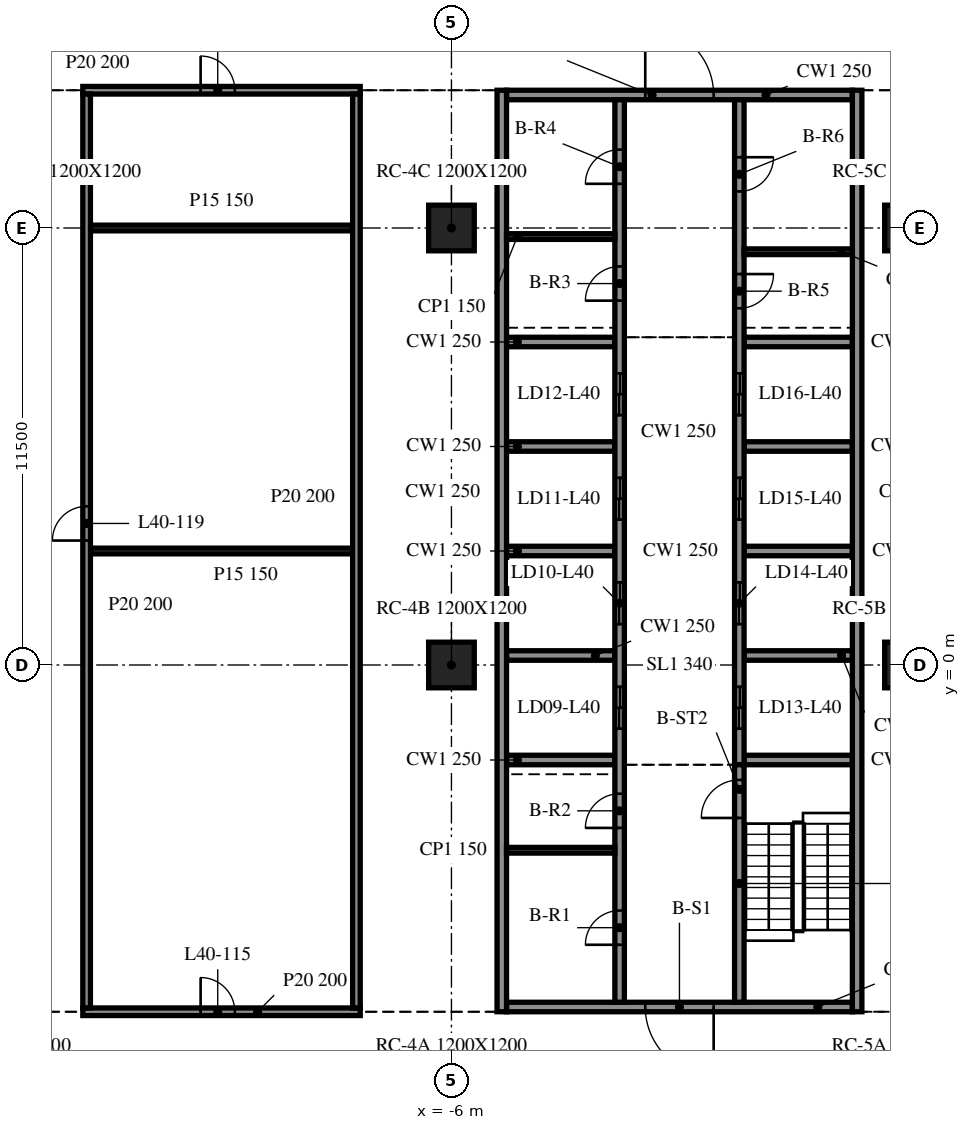
"""IFC4 building model, lengths in metres.
Left out: names, types, materials, properties, quantities, classifications, styles, units other than length and angle.
Written with IfcOpenShell. Run it as: python <this file> out.ifc"""

import sys

from ifc_helpers import new_model, si_unit, direction, frame, frame_2d, origin, origin_2d, place, context, subcontext, project, spatial, rectangle, extrude, element, fill, save


model = new_model("IFC4")
c1 = context("Model", 3, precision=1e-05, world=origin(), true_north=direction((0.0, 1.0)))
c2 = subcontext(c1, "Body", "Model", "MODEL_VIEW")
j1 = project(units=[si_unit("LENGTHUNIT", "METRE"), si_unit("PLANEANGLEUNIT", "RADIAN")], contexts=[c1])
p1 = place(None, origin())
s1 = spatial("IfcSite", under=j1, at=p1, CompositionType="ELEMENT")
p2 = place(p1, origin())
s2 = spatial("IfcBuilding", under=s1, at=p2, CompositionType="ELEMENT")
p3 = place(p2, frame((0.0, 0.0, 170.6)))
s3 = spatial("IfcBuildingStorey", under=s2, at=p3, CompositionType="ELEMENT", Elevation=170.6)
for number, where, z_axis, x_axis in (
    (1, (-6.0, 0.0, -0.34), (0.0, 0.0, 1.0), (1.0, 0.0, 0.0)),
    (2, (-6.0, 11.5, -0.34), (0.0, 0.0, 1.0), (1.0, 0.0, 0.0)),
    (3, (6.0, 0.0, -0.34), (0.0, 0.0, 1.0), (1.0, 0.0, 0.0)),
    (4, (6.0, 11.5, -0.34), (0.0, 0.0, 1.0), (1.0, 0.0, 0.0)),
):
    element("IfcColumn", number, at=place(p3, frame(where, z_axis=z_axis, x_axis=x_axis)), inside=s3, PredefinedType="COLUMN", context=c2, shape_type="SweptSolid", body=[
        extrude(rectangle(XDim=1.2, YDim=1.2, at=origin_2d()), origin(), (0.0, 0.0, 1.0), 3.8),
    ])
for number, where, z_axis, x_axis in (
    (5, (-4.675, 15.125, 0.0), (0.0, 0.0, 1.0), (0.0, -1.0, 0.0)),
    (6, (4.675, -9.125, 0.0), (0.0, 0.0, 1.0), (0.0, 1.0, 0.0)),
):
    element("IfcWall", number, at=place(p3, frame(where, z_axis=z_axis, x_axis=x_axis)), inside=s3, PredefinedType="SOLIDWALL", context=c2, shape_type="SweptSolid", body=[
        extrude(rectangle(XDim=24.25, YDim=0.25, at=frame_2d((12.125, 0.0))), origin(), (0.0, 0.0, 1.0), 3.46),
    ])
p4 = place(p3, frame((4.55, -9.0, 0.0), z_axis=(0.0, 0.0, 1.0), x_axis=(-1.0, 0.0, 0.0)))
e7 = element("IfcWall", 7, at=p4, inside=s3, PredefinedType="SOLIDWALL", context=c2, shape_type="SweptSolid", body=[
    extrude(rectangle(XDim=9.1, YDim=0.25, at=frame_2d((4.55, 0.0))), origin(), (0.0, 0.0, 1.0), 3.46),
])
p5 = place(p4, frame((3.65, 0.0, 0.0)))
e8 = element("IfcOpeningElement", 8, at=p5, cuts=e7, PredefinedType="OPENING", context=c2, shape_type="SweptSolid", body=[
    extrude(rectangle(XDim=1.8, YDim=2.1, at=frame_2d((0.9, 1.05))), frame((0.0, 0.135, 0.0), z_axis=(0.0, -1.0, 0.0), x_axis=(1.0, 0.0, 0.0)), (0.0, 0.0, 1.0), 0.27),
])
p6 = place(p3, frame((-4.55, 15.0, 0.0), z_axis=(0.0, 0.0, 1.0), x_axis=(1.0, 0.0, 0.0)))
e9 = element("IfcWall", 9, at=p6, inside=s3, PredefinedType="SOLIDWALL", context=c2, shape_type="SweptSolid", body=[
    extrude(rectangle(XDim=9.1, YDim=0.25, at=frame_2d((4.55, 0.0))), origin(), (0.0, 0.0, 1.0), 3.46),
])
p7 = place(p6, frame((3.65, 0.0, 0.0)))
e10 = element("IfcOpeningElement", 10, at=p7, cuts=e9, PredefinedType="OPENING", context=c2, shape_type="SweptSolid", body=[
    extrude(rectangle(XDim=1.8, YDim=2.1, at=frame_2d((0.9, 1.05))), frame((0.0, 0.135, 0.0), z_axis=(0.0, -1.0, 0.0), x_axis=(1.0, 0.0, 0.0)), (0.0, 0.0, 1.0), 0.27),
])
p8 = place(p3, frame((-1.575, -8.875, 0.0), z_axis=(0.0, 0.0, 1.0), x_axis=(0.0, 1.0, 0.0)))
e11 = element("IfcWall", 11, at=p8, inside=s3, PredefinedType="SOLIDWALL", context=c2, shape_type="SweptSolid", body=[
    extrude(rectangle(XDim=23.75, YDim=0.25, at=frame_2d((11.875, 0.0))), origin(), (0.0, 0.0, 1.0), 3.46),
])
p9 = place(p8, frame((7.2, 0.0, 0.0)))
e12 = element("IfcOpeningElement", 12, at=p9, cuts=e11, PredefinedType="OPENING", context=c2, shape_type="SweptSolid", body=[
    extrude(rectangle(XDim=1.1, YDim=2.1, at=frame_2d((0.55, 1.05))), frame((0.0, 0.135, 0.0), z_axis=(0.0, -1.0, 0.0), x_axis=(1.0, 0.0, 0.0)), (0.0, 0.0, 1.0), 0.27),
])
p10 = place(p8, frame((9.95, 0.0, 0.0)))
e13 = element("IfcOpeningElement", 13, at=p10, cuts=e11, PredefinedType="OPENING", context=c2, shape_type="SweptSolid", body=[
    extrude(rectangle(XDim=1.1, YDim=2.1, at=frame_2d((0.55, 1.05))), frame((0.0, 0.135, 0.0), z_axis=(0.0, -1.0, 0.0), x_axis=(1.0, 0.0, 0.0)), (0.0, 0.0, 1.0), 0.27),
])
p11 = place(p8, frame((12.7, 0.0, 0.0)))
e14 = element("IfcOpeningElement", 14, at=p11, cuts=e11, PredefinedType="OPENING", context=c2, shape_type="SweptSolid", body=[
    extrude(rectangle(XDim=1.1, YDim=2.1, at=frame_2d((0.55, 1.05))), frame((0.0, 0.135, 0.0), z_axis=(0.0, -1.0, 0.0), x_axis=(1.0, 0.0, 0.0)), (0.0, 0.0, 1.0), 0.27),
])
p12 = place(p8, frame((15.45, 0.0, 0.0)))
e15 = element("IfcOpeningElement", 15, at=p12, cuts=e11, PredefinedType="OPENING", context=c2, shape_type="SweptSolid", body=[
    extrude(rectangle(XDim=1.1, YDim=2.1, at=frame_2d((0.55, 1.05))), frame((0.0, 0.135, 0.0), z_axis=(0.0, -1.0, 0.0), x_axis=(1.0, 0.0, 0.0)), (0.0, 0.0, 1.0), 0.27),
])
p13 = place(p8, frame((1.512, 0.0, 0.0)))
e16 = element("IfcOpeningElement", 16, at=p13, cuts=e11, PredefinedType="OPENING", context=c2, shape_type="SweptSolid", body=[
    extrude(rectangle(XDim=0.9, YDim=2.1, at=frame_2d((0.45, 1.05))), frame((0.0, 0.135, 0.0), z_axis=(0.0, -1.0, 0.0), x_axis=(1.0, 0.0, 0.0)), (0.0, 0.0, 1.0), 0.27),
])
p14 = place(p8, frame((4.587, 0.0, 0.0)))
e17 = element("IfcOpeningElement", 17, at=p14, cuts=e11, PredefinedType="OPENING", context=c2, shape_type="SweptSolid", body=[
    extrude(rectangle(XDim=0.9, YDim=2.1, at=frame_2d((0.45, 1.05))), frame((0.0, 0.135, 0.0), z_axis=(0.0, -1.0, 0.0), x_axis=(1.0, 0.0, 0.0)), (0.0, 0.0, 1.0), 0.27),
])
p15 = place(p8, frame((18.462, 0.0, 0.0)))
e18 = element("IfcOpeningElement", 18, at=p15, cuts=e11, PredefinedType="OPENING", context=c2, shape_type="SweptSolid", body=[
    extrude(rectangle(XDim=0.9, YDim=2.1, at=frame_2d((0.45, 1.05))), frame((0.0, 0.135, 0.0), z_axis=(0.0, -1.0, 0.0), x_axis=(1.0, 0.0, 0.0)), (0.0, 0.0, 1.0), 0.27),
])
p16 = place(p8, frame((21.538, 0.0, 0.0)))
e19 = element("IfcOpeningElement", 19, at=p16, cuts=e11, PredefinedType="OPENING", context=c2, shape_type="SweptSolid", body=[
    extrude(rectangle(XDim=0.9, YDim=2.1, at=frame_2d((0.45, 1.05))), frame((0.0, 0.135, 0.0), z_axis=(0.0, -1.0, 0.0), x_axis=(1.0, 0.0, 0.0)), (0.0, 0.0, 1.0), 0.27),
])
p17 = place(p3, frame((1.575, -8.875, 0.0), z_axis=(0.0, 0.0, 1.0), x_axis=(0.0, 1.0, 0.0)))
e20 = element("IfcWall", 20, at=p17, inside=s3, PredefinedType="SOLIDWALL", context=c2, shape_type="SweptSolid", body=[
    extrude(rectangle(XDim=6.25, YDim=0.25, at=frame_2d((3.125, 0.0))), origin(), (0.0, 0.0, 1.0), 3.46),
])
p18 = place(p17, frame((4.85, 0.0, 0.0)))
e21 = element("IfcOpeningElement", 21, at=p18, cuts=e20, PredefinedType="OPENING", context=c2, shape_type="SweptSolid", body=[
    extrude(rectangle(XDim=1.0, YDim=2.1, at=frame_2d((0.5, 1.05))), frame((0.0, 0.135, 0.0), z_axis=(0.0, -1.0, 0.0), x_axis=(1.0, 0.0, 0.0)), (0.0, 0.0, 1.0), 0.27),
])
p19 = place(p3, frame((1.575, 14.875, 0.0), z_axis=(0.0, 0.0, 1.0), x_axis=(0.0, -1.0, 0.0)))
e22 = element("IfcWall", 22, at=p19, inside=s3, PredefinedType="SOLIDWALL", context=c2, shape_type="SweptSolid", body=[
    extrude(rectangle(XDim=17.5, YDim=0.25, at=frame_2d((8.75, 0.0))), origin(), (0.0, 0.0, 1.0), 3.46),
])
p20 = place(p19, frame((15.45, 0.0, 0.0)))
e23 = element("IfcOpeningElement", 23, at=p20, cuts=e22, PredefinedType="OPENING", context=c2, shape_type="SweptSolid", body=[
    extrude(rectangle(XDim=1.1, YDim=2.1, at=frame_2d((0.55, 1.05))), frame((0.0, 0.135, 0.0), z_axis=(0.0, -1.0, 0.0), x_axis=(1.0, 0.0, 0.0)), (0.0, 0.0, 1.0), 0.27),
])
p21 = place(p19, frame((12.7, 0.0, 0.0)))
e24 = element("IfcOpeningElement", 24, at=p21, cuts=e22, PredefinedType="OPENING", context=c2, shape_type="SweptSolid", body=[
    extrude(rectangle(XDim=1.1, YDim=2.1, at=frame_2d((0.55, 1.05))), frame((0.0, 0.135, 0.0), z_axis=(0.0, -1.0, 0.0), x_axis=(1.0, 0.0, 0.0)), (0.0, 0.0, 1.0), 0.27),
])
p22 = place(p19, frame((9.95, 0.0, 0.0)))
e25 = element("IfcOpeningElement", 25, at=p22, cuts=e22, PredefinedType="OPENING", context=c2, shape_type="SweptSolid", body=[
    extrude(rectangle(XDim=1.1, YDim=2.1, at=frame_2d((0.55, 1.05))), frame((0.0, 0.135, 0.0), z_axis=(0.0, -1.0, 0.0), x_axis=(1.0, 0.0, 0.0)), (0.0, 0.0, 1.0), 0.27),
])
p23 = place(p19, frame((7.2, 0.0, 0.0)))
e26 = element("IfcOpeningElement", 26, at=p23, cuts=e22, PredefinedType="OPENING", context=c2, shape_type="SweptSolid", body=[
    extrude(rectangle(XDim=1.1, YDim=2.1, at=frame_2d((0.55, 1.05))), frame((0.0, 0.135, 0.0), z_axis=(0.0, -1.0, 0.0), x_axis=(1.0, 0.0, 0.0)), (0.0, 0.0, 1.0), 0.27),
])
p24 = place(p19, frame((4.587, 0.0, 0.0)))
e27 = element("IfcOpeningElement", 27, at=p24, cuts=e22, PredefinedType="OPENING", context=c2, shape_type="SweptSolid", body=[
    extrude(rectangle(XDim=0.9, YDim=2.1, at=frame_2d((0.45, 1.05))), frame((0.0, 0.135, 0.0), z_axis=(0.0, -1.0, 0.0), x_axis=(1.0, 0.0, 0.0)), (0.0, 0.0, 1.0), 0.27),
])
p25 = place(p19, frame((1.512, 0.0, 0.0)))
e28 = element("IfcOpeningElement", 28, at=p25, cuts=e22, PredefinedType="OPENING", context=c2, shape_type="SweptSolid", body=[
    extrude(rectangle(XDim=0.9, YDim=2.1, at=frame_2d((0.45, 1.05))), frame((0.0, 0.135, 0.0), z_axis=(0.0, -1.0, 0.0), x_axis=(1.0, 0.0, 0.0)), (0.0, 0.0, 1.0), 0.27),
])
for number, where, z_axis, x_axis in (
    (29, (-4.55, -2.5, 0.0), (0.0, 0.0, 1.0), (1.0, 0.0, 0.0)),
    (30, (-4.55, 0.25, 0.0), (0.0, 0.0, 1.0), (1.0, 0.0, 0.0)),
    (31, (-4.55, 3.0, 0.0), (0.0, 0.0, 1.0), (1.0, 0.0, 0.0)),
    (32, (-4.55, 5.75, 0.0), (0.0, 0.0, 1.0), (1.0, 0.0, 0.0)),
    (33, (-4.55, 8.5, 0.0), (0.0, 0.0, 1.0), (1.0, 0.0, 0.0)),
    (34, (1.7, -2.5, 0.0), (0.0, 0.0, 1.0), (1.0, 0.0, 0.0)),
    (35, (1.7, 0.25, 0.0), (0.0, 0.0, 1.0), (1.0, 0.0, 0.0)),
    (36, (1.7, 3.0, 0.0), (0.0, 0.0, 1.0), (1.0, 0.0, 0.0)),
    (37, (1.7, 5.75, 0.0), (0.0, 0.0, 1.0), (1.0, 0.0, 0.0)),
    (38, (1.7, 8.5, 0.0), (0.0, 0.0, 1.0), (1.0, 0.0, 0.0)),
):
    element("IfcWall", number, at=place(p3, frame(where, z_axis=z_axis, x_axis=x_axis)), inside=s3, PredefinedType="SOLIDWALL", context=c2, shape_type="SweptSolid", body=[
        extrude(rectangle(XDim=2.85, YDim=0.25, at=frame_2d((1.425, 0.0))), origin(), (0.0, 0.0, 1.0), 3.46),
    ])
for number, where, z_axis, x_axis in (
    (39, (-4.55, -4.875, 0.0), (0.0, 0.0, 1.0), (1.0, 0.0, 0.0)),
    (40, (-4.55, 11.275, 0.0), (0.0, 0.0, 1.0), (1.0, 0.0, 0.0)),
    (41, (1.7, 10.875, 0.0), (0.0, 0.0, 1.0), (1.0, 0.0, 0.0)),
):
    element("IfcWall", number, at=place(p3, frame(where, z_axis=z_axis, x_axis=x_axis)), inside=s3, PredefinedType="PARTITIONING", context=c2, shape_type="SweptSolid", body=[
        extrude(rectangle(XDim=2.85, YDim=0.15, at=frame_2d((1.425, 0.0))), origin(), (0.0, 0.0, 1.0), 3.46),
    ])
p26 = place(p3, frame((-15.7, -9.125, 0.0), z_axis=(0.0, 0.0, 1.0), x_axis=(1.0, 0.0, 0.0)))
e42 = element("IfcWall", 42, at=p26, inside=s3, PredefinedType="PARTITIONING", context=c2, shape_type="SweptSolid", body=[
    extrude(rectangle(XDim=7.3, YDim=0.2, at=frame_2d((3.65, 0.0))), origin(), (0.0, 0.0, 1.0), 3.46),
])
p27 = place(p26, frame((3.1, 0.0, 0.0)))
e43 = element("IfcOpeningElement", 43, at=p27, cuts=e42, PredefinedType="OPENING", context=c2, shape_type="SweptSolid", body=[
    extrude(rectangle(XDim=0.9, YDim=2.1, at=frame_2d((0.45, 1.05))), frame((0.0, 0.11, 0.0), z_axis=(0.0, -1.0, 0.0), x_axis=(1.0, 0.0, 0.0)), (0.0, 0.0, 1.0), 0.22),
])
for number, where, z_axis, x_axis in (
    (44, (-15.5, 3.0, 0.0), (0.0, 0.0, 1.0), (1.0, 0.0, 0.0)),
    (45, (-15.5, 11.5, 0.0), (0.0, 0.0, 1.0), (1.0, 0.0, 0.0)),
):
    element("IfcWall", number, at=place(p3, frame(where, z_axis=z_axis, x_axis=x_axis)), inside=s3, PredefinedType="PARTITIONING", context=c2, shape_type="SweptSolid", body=[
        extrude(rectangle(XDim=6.9, YDim=0.15, at=frame_2d((3.45, 0.0))), origin(), (0.0, 0.0, 1.0), 3.46),
    ])
p28 = place(p3, frame((-15.7, 15.125, 0.0), z_axis=(0.0, 0.0, 1.0), x_axis=(1.0, 0.0, 0.0)))
e46 = element("IfcWall", 46, at=p28, inside=s3, PredefinedType="PARTITIONING", context=c2, shape_type="SweptSolid", body=[
    extrude(rectangle(XDim=7.3, YDim=0.2, at=frame_2d((3.65, 0.0))), origin(), (0.0, 0.0, 1.0), 3.46),
])
p29 = place(p28, frame((3.1, 0.0, 0.0)))
e47 = element("IfcOpeningElement", 47, at=p29, cuts=e46, PredefinedType="OPENING", context=c2, shape_type="SweptSolid", body=[
    extrude(rectangle(XDim=0.9, YDim=2.1, at=frame_2d((0.45, 1.05))), frame((0.0, 0.11, 0.0), z_axis=(0.0, -1.0, 0.0), x_axis=(1.0, 0.0, 0.0)), (0.0, 0.0, 1.0), 0.22),
])
p30 = place(p3, frame((-15.6, -9.025, 0.0), z_axis=(0.0, 0.0, 1.0), x_axis=(0.0, 1.0, 0.0)))
e48 = element("IfcWall", 48, at=p30, inside=s3, PredefinedType="PARTITIONING", context=c2, shape_type="SweptSolid", body=[
    extrude(rectangle(XDim=24.05, YDim=0.2, at=frame_2d((12.025, 0.0))), origin(), (0.0, 0.0, 1.0), 3.46),
])
p31 = place(p30, frame((12.3, 0.0, 0.0)))
e49 = element("IfcOpeningElement", 49, at=p31, cuts=e48, PredefinedType="OPENING", context=c2, shape_type="SweptSolid", body=[
    extrude(rectangle(XDim=0.9, YDim=2.1, at=frame_2d((0.45, 1.05))), frame((0.0, 0.11, 0.0), z_axis=(0.0, -1.0, 0.0), x_axis=(1.0, 0.0, 0.0)), (0.0, 0.0, 1.0), 0.22),
])
p32 = place(p3, frame((-8.5, -9.025, 0.0), z_axis=(0.0, 0.0, 1.0), x_axis=(0.0, 1.0, 0.0)))
e50 = element("IfcWall", 50, at=p32, inside=s3, PredefinedType="PARTITIONING", context=c2, shape_type="SweptSolid", body=[
    extrude(rectangle(XDim=24.05, YDim=0.2, at=frame_2d((12.025, 0.0))), origin(), (0.0, 0.0, 1.0), 3.46),
])
p33 = place(p5, origin())
e51 = element("IfcDoor", 51, at=p33, inside=s3, OperationType="DOUBLE_DOOR_SINGLE_SWING", PredefinedType="DOOR", context=c2, shape_type="SweptSolid", body=[
    extrude(rectangle(XDim=1.8, YDim=2.1, at=frame_2d((0.9, 1.05))), frame((0.0, 0.025, 0.0), z_axis=(0.0, -1.0, 0.0), x_axis=(1.0, 0.0, 0.0)), (0.0, 0.0, 1.0), 0.05),
])
fill(e8, e51)
p34 = place(p7, origin())
e52 = element("IfcDoor", 52, at=p34, inside=s3, OperationType="DOUBLE_DOOR_SINGLE_SWING", PredefinedType="DOOR", context=c2, shape_type="SweptSolid", body=[
    extrude(rectangle(XDim=1.8, YDim=2.1, at=frame_2d((0.9, 1.05))), frame((0.0, 0.025, 0.0), z_axis=(0.0, -1.0, 0.0), x_axis=(1.0, 0.0, 0.0)), (0.0, 0.0, 1.0), 0.05),
])
fill(e10, e52)
p35 = place(p20, origin())
e53 = element("IfcDoor", 53, at=p35, inside=s3, OperationType="DOUBLE_DOOR_SLIDING", PredefinedType="DOOR", context=c2, shape_type="SweptSolid", body=[
    extrude(rectangle(XDim=1.1, YDim=2.1, at=frame_2d((0.55, 1.05))), frame((0.0, 0.025, 0.0), z_axis=(0.0, -1.0, 0.0), x_axis=(1.0, 0.0, 0.0)), (0.0, 0.0, 1.0), 0.05),
])
fill(e23, e53)
p36 = place(p21, origin())
e54 = element("IfcDoor", 54, at=p36, inside=s3, OperationType="DOUBLE_DOOR_SLIDING", PredefinedType="DOOR", context=c2, shape_type="SweptSolid", body=[
    extrude(rectangle(XDim=1.1, YDim=2.1, at=frame_2d((0.55, 1.05))), frame((0.0, 0.025, 0.0), z_axis=(0.0, -1.0, 0.0), x_axis=(1.0, 0.0, 0.0)), (0.0, 0.0, 1.0), 0.05),
])
fill(e24, e54)
p37 = place(p22, origin())
e55 = element("IfcDoor", 55, at=p37, inside=s3, OperationType="DOUBLE_DOOR_SLIDING", PredefinedType="DOOR", context=c2, shape_type="SweptSolid", body=[
    extrude(rectangle(XDim=1.1, YDim=2.1, at=frame_2d((0.55, 1.05))), frame((0.0, 0.025, 0.0), z_axis=(0.0, -1.0, 0.0), x_axis=(1.0, 0.0, 0.0)), (0.0, 0.0, 1.0), 0.05),
])
fill(e25, e55)
p38 = place(p23, origin())
e56 = element("IfcDoor", 56, at=p38, inside=s3, OperationType="DOUBLE_DOOR_SLIDING", PredefinedType="DOOR", context=c2, shape_type="SweptSolid", body=[
    extrude(rectangle(XDim=1.1, YDim=2.1, at=frame_2d((0.55, 1.05))), frame((0.0, 0.025, 0.0), z_axis=(0.0, -1.0, 0.0), x_axis=(1.0, 0.0, 0.0)), (0.0, 0.0, 1.0), 0.05),
])
fill(e26, e56)
p39 = place(p9, origin())
e57 = element("IfcDoor", 57, at=p39, inside=s3, OperationType="DOUBLE_DOOR_SLIDING", PredefinedType="DOOR", context=c2, shape_type="SweptSolid", body=[
    extrude(rectangle(XDim=1.1, YDim=2.1, at=frame_2d((0.55, 1.05))), frame((0.0, 0.025, 0.0), z_axis=(0.0, -1.0, 0.0), x_axis=(1.0, 0.0, 0.0)), (0.0, 0.0, 1.0), 0.05),
])
fill(e12, e57)
p40 = place(p10, origin())
e58 = element("IfcDoor", 58, at=p40, inside=s3, OperationType="DOUBLE_DOOR_SLIDING", PredefinedType="DOOR", context=c2, shape_type="SweptSolid", body=[
    extrude(rectangle(XDim=1.1, YDim=2.1, at=frame_2d((0.55, 1.05))), frame((0.0, 0.025, 0.0), z_axis=(0.0, -1.0, 0.0), x_axis=(1.0, 0.0, 0.0)), (0.0, 0.0, 1.0), 0.05),
])
fill(e13, e58)
p41 = place(p11, origin())
e59 = element("IfcDoor", 59, at=p41, inside=s3, OperationType="DOUBLE_DOOR_SLIDING", PredefinedType="DOOR", context=c2, shape_type="SweptSolid", body=[
    extrude(rectangle(XDim=1.1, YDim=2.1, at=frame_2d((0.55, 1.05))), frame((0.0, 0.025, 0.0), z_axis=(0.0, -1.0, 0.0), x_axis=(1.0, 0.0, 0.0)), (0.0, 0.0, 1.0), 0.05),
])
fill(e14, e59)
p42 = place(p12, origin())
e60 = element("IfcDoor", 60, at=p42, inside=s3, OperationType="DOUBLE_DOOR_SLIDING", PredefinedType="DOOR", context=c2, shape_type="SweptSolid", body=[
    extrude(rectangle(XDim=1.1, YDim=2.1, at=frame_2d((0.55, 1.05))), frame((0.0, 0.025, 0.0), z_axis=(0.0, -1.0, 0.0), x_axis=(1.0, 0.0, 0.0)), (0.0, 0.0, 1.0), 0.05),
])
fill(e15, e60)
p43 = place(p13, origin())
e61 = element("IfcDoor", 61, at=p43, inside=s3, OperationType="SINGLE_SWING_LEFT", PredefinedType="DOOR", context=c2, shape_type="SweptSolid", body=[
    extrude(rectangle(XDim=0.9, YDim=2.1, at=frame_2d((0.45, 1.05))), frame((0.0, 0.025, 0.0), z_axis=(0.0, -1.0, 0.0), x_axis=(1.0, 0.0, 0.0)), (0.0, 0.0, 1.0), 0.05),
])
fill(e16, e61)
p44 = place(p14, origin())
e62 = element("IfcDoor", 62, at=p44, inside=s3, OperationType="SINGLE_SWING_RIGHT", PredefinedType="DOOR", context=c2, shape_type="SweptSolid", body=[
    extrude(rectangle(XDim=0.9, YDim=2.1, at=frame_2d((0.45, 1.05))), frame((0.0, 0.025, 0.0), z_axis=(0.0, -1.0, 0.0), x_axis=(1.0, 0.0, 0.0)), (0.0, 0.0, 1.0), 0.05),
])
fill(e17, e62)
p45 = place(p15, origin())
e63 = element("IfcDoor", 63, at=p45, inside=s3, OperationType="SINGLE_SWING_LEFT", PredefinedType="DOOR", context=c2, shape_type="SweptSolid", body=[
    extrude(rectangle(XDim=0.9, YDim=2.1, at=frame_2d((0.45, 1.05))), frame((0.0, 0.025, 0.0), z_axis=(0.0, -1.0, 0.0), x_axis=(1.0, 0.0, 0.0)), (0.0, 0.0, 1.0), 0.05),
])
fill(e18, e63)
p46 = place(p16, origin())
e64 = element("IfcDoor", 64, at=p46, inside=s3, OperationType="SINGLE_SWING_RIGHT", PredefinedType="DOOR", context=c2, shape_type="SweptSolid", body=[
    extrude(rectangle(XDim=0.9, YDim=2.1, at=frame_2d((0.45, 1.05))), frame((0.0, 0.025, 0.0), z_axis=(0.0, -1.0, 0.0), x_axis=(1.0, 0.0, 0.0)), (0.0, 0.0, 1.0), 0.05),
])
fill(e19, e64)
p47 = place(p24, origin())
e65 = element("IfcDoor", 65, at=p47, inside=s3, OperationType="SINGLE_SWING_LEFT", PredefinedType="DOOR", context=c2, shape_type="SweptSolid", body=[
    extrude(rectangle(XDim=0.9, YDim=2.1, at=frame_2d((0.45, 1.05))), frame((0.0, 0.025, 0.0), z_axis=(0.0, -1.0, 0.0), x_axis=(1.0, 0.0, 0.0)), (0.0, 0.0, 1.0), 0.05),
])
fill(e27, e65)
p48 = place(p25, origin())
e66 = element("IfcDoor", 66, at=p48, inside=s3, OperationType="SINGLE_SWING_RIGHT", PredefinedType="DOOR", context=c2, shape_type="SweptSolid", body=[
    extrude(rectangle(XDim=0.9, YDim=2.1, at=frame_2d((0.45, 1.05))), frame((0.0, 0.025, 0.0), z_axis=(0.0, -1.0, 0.0), x_axis=(1.0, 0.0, 0.0)), (0.0, 0.0, 1.0), 0.05),
])
fill(e28, e66)
p49 = place(p18, origin())
e67 = element("IfcDoor", 67, at=p49, inside=s3, OperationType="SINGLE_SWING_LEFT", PredefinedType="DOOR", context=c2, shape_type="SweptSolid", body=[
    extrude(rectangle(XDim=1.0, YDim=2.1, at=frame_2d((0.5, 1.05))), frame((0.0, 0.025, 0.0), z_axis=(0.0, -1.0, 0.0), x_axis=(1.0, 0.0, 0.0)), (0.0, 0.0, 1.0), 0.05),
])
fill(e21, e67)
p50 = place(p27, origin())
e68 = element("IfcDoor", 68, at=p50, inside=s3, OperationType="SINGLE_SWING_LEFT", PredefinedType="DOOR", context=c2, shape_type="SweptSolid", body=[
    extrude(rectangle(XDim=0.9, YDim=2.1, at=frame_2d((0.45, 1.05))), frame((0.0, 0.025, 0.0), z_axis=(0.0, -1.0, 0.0), x_axis=(1.0, 0.0, 0.0)), (0.0, 0.0, 1.0), 0.05),
])
fill(e43, e68)
p51 = place(p31, origin())
e69 = element("IfcDoor", 69, at=p51, inside=s3, OperationType="SINGLE_SWING_LEFT", PredefinedType="DOOR", context=c2, shape_type="SweptSolid", body=[
    extrude(rectangle(XDim=0.9, YDim=2.1, at=frame_2d((0.45, 1.05))), frame((0.0, 0.025, 0.0), z_axis=(0.0, -1.0, 0.0), x_axis=(1.0, 0.0, 0.0)), (0.0, 0.0, 1.0), 0.05),
])
fill(e49, e69)
p52 = place(p29, origin())
e70 = element("IfcDoor", 70, at=p52, inside=s3, OperationType="SINGLE_SWING_RIGHT", PredefinedType="DOOR", context=c2, shape_type="SweptSolid", body=[
    extrude(rectangle(XDim=0.9, YDim=2.1, at=frame_2d((0.45, 1.05))), frame((0.0, 0.025, 0.0), z_axis=(0.0, -1.0, 0.0), x_axis=(1.0, 0.0, 0.0)), (0.0, 0.0, 1.0), 0.05),
])
fill(e47, e70)
save(model, sys.argv[1])
